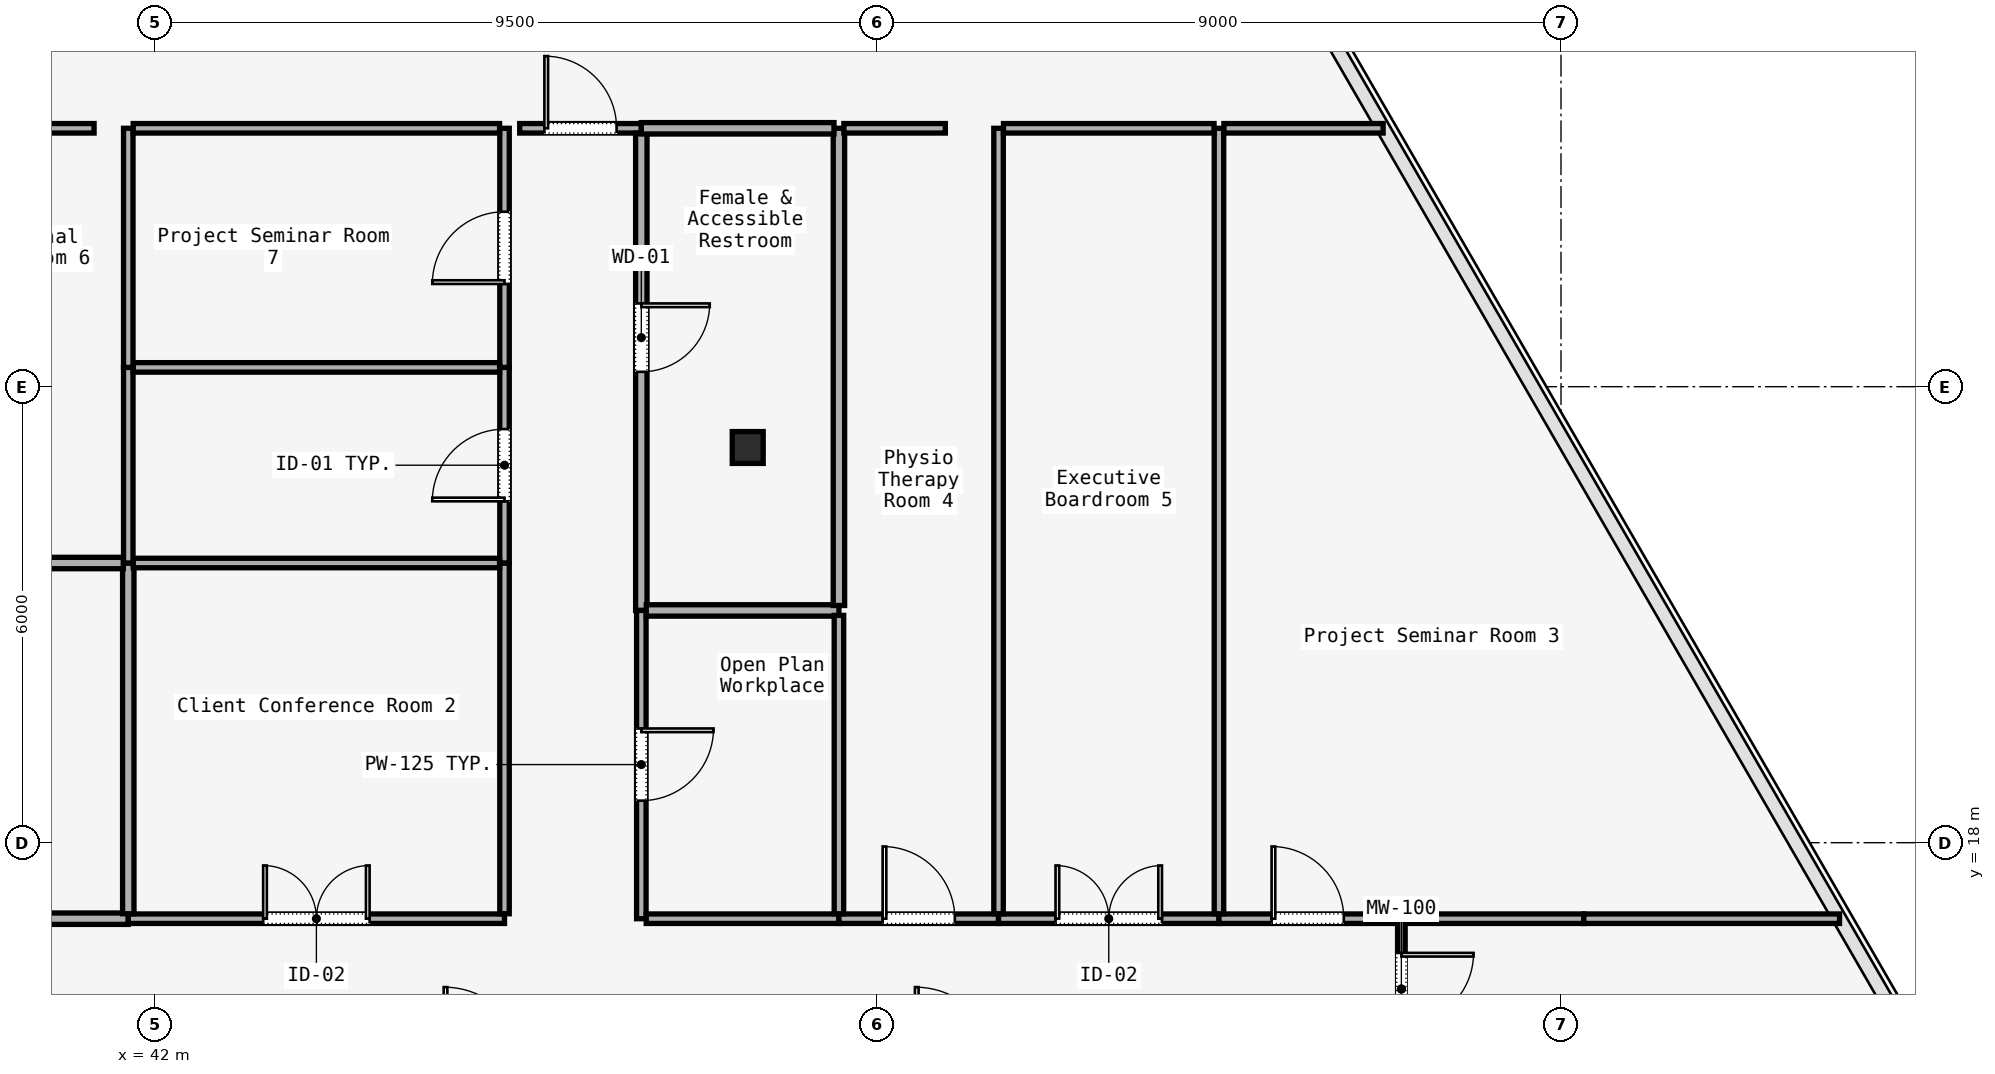
"""IFC4 building model, lengths in metres.
Left out: names, types, materials, properties, quantities, classifications, styles, units other than length and angle.
Written with IfcOpenShell. Run it as: python <this file> out.ifc"""

import sys

from ifc_helpers import new_model, si_unit, direction, frame, frame_2d, origin, origin_2d, place, context, subcontext, project, spatial, rectangle, i_section, extrude, element, fill, save


model = new_model("IFC4")
c1 = context("Model", 3, precision=1e-05, world=origin(), true_north=direction((0.0, 1.0)))
c2 = subcontext(c1, "Body", "Model", "MODEL_VIEW")
j1 = project(units=[si_unit("LENGTHUNIT", "METRE"), si_unit("PLANEANGLEUNIT", "RADIAN")], contexts=[c1])
p1 = place(None, origin())
s1 = spatial("IfcSite", under=j1, at=p1, CompositionType="ELEMENT")
p2 = place(p1, origin())
s2 = spatial("IfcBuilding", under=s1, at=p2, CompositionType="ELEMENT")
p3 = place(p2, frame((0.0, 0.0, 161.2)))
s3 = spatial("IfcBuildingStorey", under=s2, at=p3, CompositionType="ELEMENT", Elevation=161.2)
p4 = place(p3, frame((49.8, 23.2, 0.0), z_axis=(0.0, 0.0, 1.0), x_axis=(1.0, 0.0, 0.0)))
e1 = element("IfcColumn", 1, at=p4, inside=s3, PredefinedType="COLUMN", context=c2, shape_type="SweptSolid", body=[
    extrude(i_section(OverallWidth=0.407, OverallDepth=0.419, WebThickness=0.031, FlangeThickness=0.049, FilletRadius=0.015, at=origin_2d()), origin(), (0.0, 0.0, 1.0), 3.58),
])
p5 = place(p3, frame((58.4, 17.0, 0.0), z_axis=(0.0, 0.0, 1.0), x_axis=(0.0, -1.0, 0.0)))
e2 = element("IfcWall", 2, at=p5, inside=s3, PredefinedType="MOVABLE", context=c2, shape_type="SweptSolid", body=[
    extrude(rectangle(XDim=1.85, YDim=0.1, at=frame_2d((0.925, 0.0))), origin(), (0.0, 0.0, 1.0), 3.01),
])
p6 = place(p5, frame((0.45, 0.0, 0.0)))
e3 = element("IfcOpeningElement", 3, at=p6, cuts=e2, PredefinedType="OPENING", context=c2, shape_type="SweptSolid", body=[
    extrude(rectangle(XDim=0.95, YDim=2.2, at=frame_2d((0.475, 1.1))), frame((0.0, 0.05, 0.0), z_axis=(0.0, -1.0, 0.0), x_axis=(1.0, 0.0, 0.0)), (0.0, 0.0, 1.0), 0.1),
])
p7 = place(p3, frame((37.665, 17.0, 0.0), z_axis=(0.0, 0.0, 1.0), x_axis=(1.0, 0.0, 0.0)))
e4 = element("IfcWall", 4, at=p7, inside=s3, PredefinedType="PARTITIONING", context=c2, shape_type="SweptSolid", body=[
    extrude(rectangle(XDim=3.985, YDim=0.15, at=frame_2d((1.992, 0.0))), origin(), (0.0, 0.0, 1.0), 3.01),
])
p8 = place(p3, frame((41.65, 17.0, 0.0), z_axis=(0.0, 0.0, 1.0), x_axis=(1.0, 0.0, 0.0)))
e5 = element("IfcWall", 5, at=p8, inside=s3, PredefinedType="PARTITIONING", context=c2, shape_type="SweptSolid", body=[
    extrude(rectangle(XDim=4.95, YDim=0.125, at=frame_2d((2.475, 0.0))), origin(), (0.0, 0.0, 1.0), 3.01),
])
p9 = place(p8, frame((1.775, 0.0, 0.0)))
e6 = element("IfcOpeningElement", 6, at=p9, cuts=e5, PredefinedType="OPENING", context=c2, shape_type="SweptSolid", body=[
    extrude(rectangle(XDim=1.4, YDim=2.2, at=frame_2d((0.7, 1.1))), frame((0.0, 0.062, 0.0), z_axis=(0.0, -1.0, 0.0), x_axis=(1.0, 0.0, 0.0)), (0.0, 0.0, 1.0), 0.125),
])
p10 = place(p3, frame((46.6, 17.065, 0.0), z_axis=(0.0, 0.0, 1.0), x_axis=(0.0, 1.0, 0.0)))
e7 = element("IfcWall", 7, at=p10, inside=s3, PredefinedType="PARTITIONING", context=c2, shape_type="SweptSolid", body=[
    extrude(rectangle(XDim=4.615, YDim=0.125, at=frame_2d((2.308, 0.0))), origin(), (0.0, 0.0, 1.0), 3.01),
])
p11 = place(p3, frame((46.6, 21.68, 0.0), z_axis=(0.0, 0.0, 1.0), x_axis=(0.0, 1.0, 0.0)))
e8 = element("IfcWall", 8, at=p11, inside=s3, PredefinedType="PARTITIONING", context=c2, shape_type="SweptSolid", body=[
    extrude(rectangle(XDim=2.574, YDim=0.125, at=frame_2d((1.287, 0.0))), origin(), (0.0, 0.0, 1.0), 3.01),
])
p12 = place(p11, frame((0.812, 0.0, 0.0)))
e9 = element("IfcOpeningElement", 9, at=p12, cuts=e8, PredefinedType="OPENING", context=c2, shape_type="SweptSolid", body=[
    extrude(rectangle(XDim=0.95, YDim=2.2, at=frame_2d((0.475, 1.1))), frame((0.0, 0.062, 0.0), z_axis=(0.0, -1.0, 0.0), x_axis=(1.0, 0.0, 0.0)), (0.0, 0.0, 1.0), 0.125),
])
p13 = place(p3, frame((46.6, 24.254, 0.0), z_axis=(0.0, 0.0, 1.0), x_axis=(0.0, 1.0, 0.0)))
e10 = element("IfcWall", 10, at=p13, inside=s3, PredefinedType="PARTITIONING", context=c2, shape_type="SweptSolid", body=[
    extrude(rectangle(XDim=3.146, YDim=0.125, at=frame_2d((1.573, 0.0))), origin(), (0.0, 0.0, 1.0), 3.01),
])
p14 = place(p13, frame((1.098, 0.0, 0.0)))
e11 = element("IfcOpeningElement", 11, at=p14, cuts=e10, PredefinedType="OPENING", context=c2, shape_type="SweptSolid", body=[
    extrude(rectangle(XDim=0.95, YDim=2.2, at=frame_2d((0.475, 1.1))), frame((0.0, 0.062, 0.0), z_axis=(0.0, -1.0, 0.0), x_axis=(1.0, 0.0, 0.0)), (0.0, 0.0, 1.0), 0.125),
])
p15 = place(p3, frame((46.8, 27.4, 0.0), z_axis=(0.0, 0.0, 1.0), x_axis=(1.0, 0.0, 0.0)))
e12 = element("IfcWall", 12, at=p15, inside=s3, PredefinedType="PARTITIONING", context=c2, shape_type="SweptSolid", body=[
    extrude(rectangle(XDim=1.6, YDim=0.125, at=frame_2d((0.8, 0.0))), origin(), (0.0, 0.0, 1.0), 3.01),
])
p16 = place(p15, frame((0.325, 0.0, 0.0)))
e13 = element("IfcOpeningElement", 13, at=p16, cuts=e12, PredefinedType="OPENING", context=c2, shape_type="SweptSolid", body=[
    extrude(rectangle(XDim=0.95, YDim=2.2, at=frame_2d((0.475, 1.1))), frame((0.0, 0.062, 0.0), z_axis=(0.0, -1.0, 0.0), x_axis=(1.0, 0.0, 0.0)), (0.0, 0.0, 1.0), 0.125),
])
p17 = place(p3, frame((48.4, 27.335, 0.0), z_axis=(0.0, 0.0, 1.0), x_axis=(0.0, -1.0, 0.0)))
e14 = element("IfcWall", 14, at=p17, inside=s3, PredefinedType="PARTITIONING", context=c2, shape_type="SweptSolid", body=[
    extrude(rectangle(XDim=6.279, YDim=0.15, at=frame_2d((3.14, 0.0))), origin(), (0.0, 0.0, 1.0), 3.01),
])
p18 = place(p17, frame((2.24, 0.0, 0.0)))
e15 = element("IfcOpeningElement", 15, at=p18, cuts=e14, PredefinedType="OPENING", context=c2, shape_type="SweptSolid", body=[
    extrude(rectangle(XDim=0.9, YDim=2.15, at=frame_2d((0.45, 1.075))), frame((0.0, 0.075, 0.0), z_axis=(0.0, -1.0, 0.0), x_axis=(1.0, 0.0, 0.0)), (0.0, 0.0, 1.0), 0.15),
])
p19 = place(p3, frame((48.4, 21.056, 0.0), z_axis=(0.0, 0.0, 1.0), x_axis=(0.0, -1.0, 0.0)))
e16 = element("IfcWall", 16, at=p19, inside=s3, PredefinedType="PARTITIONING", context=c2, shape_type="SweptSolid", body=[
    extrude(rectangle(XDim=4.056, YDim=0.125, at=frame_2d((2.028, 0.0))), origin(), (0.0, 0.0, 1.0), 3.01),
])
p20 = place(p19, frame((1.553, 0.0, 0.0)))
e17 = element("IfcOpeningElement", 17, at=p20, cuts=e16, PredefinedType="OPENING", context=c2, shape_type="SweptSolid", body=[
    extrude(rectangle(XDim=0.95, YDim=2.2, at=frame_2d((0.475, 1.1))), frame((0.0, 0.062, 0.0), z_axis=(0.0, -1.0, 0.0), x_axis=(1.0, 0.0, 0.0)), (0.0, 0.0, 1.0), 0.125),
])
p21 = place(p3, frame((48.465, 17.0, 0.0), z_axis=(0.0, 0.0, 1.0), x_axis=(1.0, 0.0, 0.0)))
e18 = element("IfcWall", 18, at=p21, inside=s3, PredefinedType="PARTITIONING", context=c2, shape_type="SweptSolid", body=[
    extrude(rectangle(XDim=2.535, YDim=0.125, at=frame_2d((1.268, 0.0))), origin(), (0.0, 0.0, 1.0), 3.01),
])
p22 = place(p3, frame((51.0, 17.0, 0.0), z_axis=(0.0, 0.0, 1.0), x_axis=(1.0, 0.0, 0.0)))
e19 = element("IfcWall", 19, at=p22, inside=s3, PredefinedType="PARTITIONING", context=c2, shape_type="SweptSolid", body=[
    extrude(rectangle(XDim=2.1, YDim=0.125, at=frame_2d((1.05, 0.0))), origin(), (0.0, 0.0, 1.0), 3.01),
])
p23 = place(p22, frame((0.575, 0.0, 0.0)))
e20 = element("IfcOpeningElement", 20, at=p23, cuts=e19, PredefinedType="OPENING", context=c2, shape_type="SweptSolid", body=[
    extrude(rectangle(XDim=0.95, YDim=2.2, at=frame_2d((0.475, 1.1))), frame((0.0, 0.062, 0.0), z_axis=(0.0, -1.0, 0.0), x_axis=(1.0, 0.0, 0.0)), (0.0, 0.0, 1.0), 0.125),
])
p24 = place(p3, frame((53.1, 17.0, 0.0), z_axis=(0.0, 0.0, 1.0), x_axis=(1.0, 0.0, 0.0)))
e21 = element("IfcWall", 21, at=p24, inside=s3, PredefinedType="PARTITIONING", context=c2, shape_type="SweptSolid", body=[
    extrude(rectangle(XDim=2.9, YDim=0.125, at=frame_2d((1.45, 0.0))), origin(), (0.0, 0.0, 1.0), 3.01),
])
p25 = place(p24, frame((0.75, 0.0, 0.0)))
e22 = element("IfcOpeningElement", 22, at=p25, cuts=e21, PredefinedType="OPENING", context=c2, shape_type="SweptSolid", body=[
    extrude(rectangle(XDim=1.4, YDim=2.2, at=frame_2d((0.7, 1.1))), frame((0.0, 0.062, 0.0), z_axis=(0.0, -1.0, 0.0), x_axis=(1.0, 0.0, 0.0)), (0.0, 0.0, 1.0), 0.125),
])
p26 = place(p3, frame((56.0, 17.0, 0.0), z_axis=(0.0, 0.0, 1.0), x_axis=(1.0, 0.0, 0.0)))
e23 = element("IfcWall", 23, at=p26, inside=s3, PredefinedType="PARTITIONING", context=c2, shape_type="SweptSolid", body=[
    extrude(rectangle(XDim=2.335, YDim=0.125, at=frame_2d((1.167, 0.0))), origin(), (0.0, 0.0, 1.0), 3.01),
])
p27 = place(p26, frame((0.692, 0.0, 0.0)))
e24 = element("IfcOpeningElement", 24, at=p27, cuts=e23, PredefinedType="OPENING", context=c2, shape_type="SweptSolid", body=[
    extrude(rectangle(XDim=0.95, YDim=2.2, at=frame_2d((0.475, 1.1))), frame((0.0, 0.062, 0.0), z_axis=(0.0, -1.0, 0.0), x_axis=(1.0, 0.0, 0.0)), (0.0, 0.0, 1.0), 0.125),
])
p28 = place(p3, frame((58.465, 17.0, 0.0), z_axis=(0.0, 0.0, 1.0), x_axis=(1.0, 0.0, 0.0)))
e25 = element("IfcWall", 25, at=p28, inside=s3, PredefinedType="PARTITIONING", context=c2, shape_type="SweptSolid", body=[
    extrude(rectangle(XDim=2.335, YDim=0.125, at=frame_2d((1.167, 0.0))), origin(), (0.0, 0.0, 1.0), 3.01),
])
p29 = place(p3, frame((60.8, 17.0, 0.0), z_axis=(0.0, 0.0, 1.0), x_axis=(1.0, 0.0, 0.0)))
e26 = element("IfcWall", 26, at=p29, inside=s3, PredefinedType="PARTITIONING", context=c2, shape_type="SweptSolid", body=[
    extrude(rectangle(XDim=3.365, YDim=0.125, at=frame_2d((1.682, 0.0))), origin(), (0.0, 0.0, 1.0), 3.01),
])
p30 = place(p3, frame((48.465, 21.056, 0.0), z_axis=(0.0, 0.0, 1.0), x_axis=(1.0, 0.0, 0.0)))
e27 = element("IfcWall", 27, at=p30, inside=s3, PredefinedType="PARTITIONING", context=c2, shape_type="SweptSolid", body=[
    extrude(rectangle(XDim=2.535, YDim=0.15, at=frame_2d((1.268, 0.0))), origin(), (0.0, 0.0, 1.0), 3.01),
])
p31 = place(p3, frame((51.0, 20.991, 0.0), z_axis=(0.0, 0.0, 1.0), x_axis=(0.0, -1.0, 0.0)))
e28 = element("IfcWall", 28, at=p31, inside=s3, PredefinedType="PARTITIONING", context=c2, shape_type="SweptSolid", body=[
    extrude(rectangle(XDim=3.926, YDim=0.125, at=frame_2d((1.963, 0.0))), origin(), (0.0, 0.0, 1.0), 3.01),
])
p32 = place(p3, frame((41.65, 21.68, 0.0), z_axis=(0.0, 0.0, 1.0), x_axis=(0.0, -1.0, 0.0)))
e29 = element("IfcWall", 29, at=p32, inside=s3, PredefinedType="PARTITIONING", context=c2, shape_type="SweptSolid", body=[
    extrude(rectangle(XDim=4.615, YDim=0.15, at=frame_2d((2.308, 0.0))), origin(), (0.0, 0.0, 1.0), 3.01),
])
p33 = place(p3, frame((37.665, 21.68, 0.0), z_axis=(0.0, 0.0, 1.0), x_axis=(1.0, 0.0, 0.0)))
e30 = element("IfcWall", 30, at=p33, inside=s3, PredefinedType="PARTITIONING", context=c2, shape_type="SweptSolid", body=[
    extrude(rectangle(XDim=3.92, YDim=0.15, at=frame_2d((1.96, 0.0))), origin(), (0.0, 0.0, 1.0), 3.01),
])
p34 = place(p3, frame((41.715, 21.68, 0.0), z_axis=(0.0, 0.0, 1.0), x_axis=(1.0, 0.0, 0.0)))
e31 = element("IfcWall", 31, at=p34, inside=s3, PredefinedType="PARTITIONING", context=c2, shape_type="SweptSolid", body=[
    extrude(rectangle(XDim=4.82, YDim=0.125, at=frame_2d((2.41, 0.0))), origin(), (0.0, 0.0, 1.0), 3.01),
])
p35 = place(p3, frame((56.0, 17.065, 0.0), z_axis=(0.0, 0.0, 1.0), x_axis=(0.0, 1.0, 0.0)))
e32 = element("IfcWall", 32, at=p35, inside=s3, PredefinedType="PARTITIONING", context=c2, shape_type="SweptSolid", body=[
    extrude(rectangle(XDim=10.335, YDim=0.125, at=frame_2d((5.167, 0.0))), origin(), (0.0, 0.0, 1.0), 3.01),
])
p36 = place(p3, frame((56.065, 27.4, 0.0), z_axis=(0.0, 0.0, 1.0), x_axis=(1.0, 0.0, 0.0)))
e33 = element("IfcWall", 33, at=p36, inside=s3, PredefinedType="PARTITIONING", context=c2, shape_type="SweptSolid", body=[
    extrude(rectangle(XDim=2.095, YDim=0.125, at=frame_2d((1.048, 0.0))), origin(), (0.0, 0.0, 1.0), 3.01),
])
p37 = place(p3, frame((51.0, 21.121, 0.0), z_axis=(0.0, 0.0, 1.0), x_axis=(0.0, 1.0, 0.0)))
e34 = element("IfcWall", 34, at=p37, inside=s3, PredefinedType="PARTITIONING", context=c2, shape_type="SweptSolid", body=[
    extrude(rectangle(XDim=6.279, YDim=0.15, at=frame_2d((3.139, 0.0))), origin(), (0.0, 0.0, 1.0), 3.01),
])
p38 = place(p3, frame((51.065, 27.4, 0.0), z_axis=(0.0, 0.0, 1.0), x_axis=(1.0, 0.0, 0.0)))
e35 = element("IfcWall", 35, at=p38, inside=s3, PredefinedType="PARTITIONING", context=c2, shape_type="SweptSolid", body=[
    extrude(rectangle(XDim=1.335, YDim=0.125, at=frame_2d((0.667, 0.0))), origin(), (0.0, 0.0, 1.0), 3.01),
])
p39 = place(p3, frame((53.1, 27.4, 0.0), z_axis=(0.0, 0.0, 1.0), x_axis=(0.0, -1.0, 0.0)))
e36 = element("IfcWall", 36, at=p39, inside=s3, PredefinedType="PARTITIONING", context=c2, shape_type="SweptSolid", body=[
    extrude(rectangle(XDim=10.335, YDim=0.125, at=frame_2d((5.167, 0.0))), origin(), (0.0, 0.0, 1.0), 3.01),
])
p40 = place(p3, frame((53.165, 27.4, 0.0), z_axis=(0.0, 0.0, 1.0), x_axis=(1.0, 0.0, 0.0)))
e37 = element("IfcWall", 37, at=p40, inside=s3, PredefinedType="PARTITIONING", context=c2, shape_type="SweptSolid", body=[
    extrude(rectangle(XDim=2.77, YDim=0.125, at=frame_2d((1.385, 0.0))), origin(), (0.0, 0.0, 1.0), 3.01),
])
p41 = place(p3, frame((41.65, 21.68, 0.0), z_axis=(0.0, 0.0, 1.0), x_axis=(0.0, 1.0, 0.0)))
e38 = element("IfcWall", 38, at=p41, inside=s3, PredefinedType="PARTITIONING", context=c2, shape_type="SweptSolid", body=[
    extrude(rectangle(XDim=2.574, YDim=0.125, at=frame_2d((1.287, 0.0))), origin(), (0.0, 0.0, 1.0), 3.01),
])
p42 = place(p3, frame((41.715, 24.254, 0.0), z_axis=(0.0, 0.0, 1.0), x_axis=(1.0, 0.0, 0.0)))
e39 = element("IfcWall", 39, at=p42, inside=s3, PredefinedType="PARTITIONING", context=c2, shape_type="SweptSolid", body=[
    extrude(rectangle(XDim=4.82, YDim=0.125, at=frame_2d((2.41, 0.0))), origin(), (0.0, 0.0, 1.0), 3.01),
])
p43 = place(p3, frame((48.4, 27.4, 0.0), z_axis=(0.0, 0.0, 1.0), x_axis=(1.0, 0.0, 0.0)))
e40 = element("IfcWall", 40, at=p43, inside=s3, PredefinedType="PARTITIONING", context=c2, shape_type="SweptSolid", body=[
    extrude(rectangle(XDim=2.535, YDim=0.15, at=frame_2d((1.268, 0.0))), origin(), (0.0, 0.0, 1.0), 3.01),
])
p44 = place(p3, frame((41.65, 27.4, 0.0), z_axis=(0.0, 0.0, 1.0), x_axis=(0.0, -1.0, 0.0)))
e41 = element("IfcWall", 41, at=p44, inside=s3, PredefinedType="PARTITIONING", context=c2, shape_type="SweptSolid", body=[
    extrude(rectangle(XDim=3.146, YDim=0.125, at=frame_2d((1.573, 0.0))), origin(), (0.0, 0.0, 1.0), 3.01),
])
p45 = place(p3, frame((38.445, 27.4, 0.0), z_axis=(0.0, 0.0, 1.0), x_axis=(1.0, 0.0, 0.0)))
e42 = element("IfcWall", 42, at=p45, inside=s3, PredefinedType="PARTITIONING", context=c2, shape_type="SweptSolid", body=[
    extrude(rectangle(XDim=2.755, YDim=0.125, at=frame_2d((1.377, 0.0))), origin(), (0.0, 0.0, 1.0), 3.01),
])
p46 = place(p3, frame((41.715, 27.4, 0.0), z_axis=(0.0, 0.0, 1.0), x_axis=(1.0, 0.0, 0.0)))
e43 = element("IfcWall", 43, at=p46, inside=s3, PredefinedType="PARTITIONING", context=c2, shape_type="SweptSolid", body=[
    extrude(rectangle(XDim=4.82, YDim=0.125, at=frame_2d((2.41, 0.0))), origin(), (0.0, 0.0, 1.0), 3.01),
])
p47 = place(p6, origin())
e44 = element("IfcDoor", 44, at=p47, inside=s3, OperationType="SINGLE_SWING_RIGHT", PredefinedType="DOOR", context=c2, shape_type="SweptSolid", body=[
    extrude(rectangle(XDim=0.95, YDim=2.2, at=frame_2d((0.475, 1.1))), frame((0.0, 0.025, 0.0), z_axis=(0.0, -1.0, 0.0), x_axis=(1.0, 0.0, 0.0)), (0.0, 0.0, 1.0), 0.05),
])
fill(e3, e44)
p48 = place(p20, origin())
e45 = element("IfcDoor", 45, at=p48, inside=s3, OperationType="SINGLE_SWING_LEFT", PredefinedType="DOOR", context=c2, shape_type="SweptSolid", body=[
    extrude(rectangle(XDim=0.95, YDim=2.2, at=frame_2d((0.475, 1.1))), frame((0.0, 0.025, 0.0), z_axis=(0.0, -1.0, 0.0), x_axis=(1.0, 0.0, 0.0)), (0.0, 0.0, 1.0), 0.05),
])
fill(e17, e45)
p49 = place(p9, origin())
e46 = element("IfcDoor", 46, at=p49, inside=s3, OperationType="SINGLE_SWING_RIGHT", PredefinedType="DOOR", context=c2, shape_type="SweptSolid", body=[
    extrude(rectangle(XDim=1.4, YDim=2.2, at=frame_2d((0.7, 1.1))), frame((0.0, 0.025, 0.0), z_axis=(0.0, -1.0, 0.0), x_axis=(1.0, 0.0, 0.0)), (0.0, 0.0, 1.0), 0.05),
])
fill(e6, e46)
p50 = place(p27, origin())
e47 = element("IfcDoor", 47, at=p50, inside=s3, OperationType="SINGLE_SWING_LEFT", PredefinedType="DOOR", context=c2, shape_type="SweptSolid", body=[
    extrude(rectangle(XDim=0.95, YDim=2.2, at=frame_2d((0.475, 1.1))), frame((0.0, 0.025, 0.0), z_axis=(0.0, -1.0, 0.0), x_axis=(1.0, 0.0, 0.0)), (0.0, 0.0, 1.0), 0.05),
])
fill(e24, e47)
p51 = place(p23, origin())
e48 = element("IfcDoor", 48, at=p51, inside=s3, OperationType="SINGLE_SWING_LEFT", PredefinedType="DOOR", context=c2, shape_type="SweptSolid", body=[
    extrude(rectangle(XDim=0.95, YDim=2.2, at=frame_2d((0.475, 1.1))), frame((0.0, 0.025, 0.0), z_axis=(0.0, -1.0, 0.0), x_axis=(1.0, 0.0, 0.0)), (0.0, 0.0, 1.0), 0.05),
])
fill(e20, e48)
p52 = place(p25, origin())
e49 = element("IfcDoor", 49, at=p52, inside=s3, OperationType="SINGLE_SWING_RIGHT", PredefinedType="DOOR", context=c2, shape_type="SweptSolid", body=[
    extrude(rectangle(XDim=1.4, YDim=2.2, at=frame_2d((0.7, 1.1))), frame((0.0, 0.025, 0.0), z_axis=(0.0, -1.0, 0.0), x_axis=(1.0, 0.0, 0.0)), (0.0, 0.0, 1.0), 0.05),
])
fill(e22, e49)
p53 = place(p12, origin())
e50 = element("IfcDoor", 50, at=p53, inside=s3, OperationType="SINGLE_SWING_LEFT", PredefinedType="DOOR", context=c2, shape_type="SweptSolid", body=[
    extrude(rectangle(XDim=0.95, YDim=2.2, at=frame_2d((0.475, 1.1))), frame((0.0, 0.025, 0.0), z_axis=(0.0, -1.0, 0.0), x_axis=(1.0, 0.0, 0.0)), (0.0, 0.0, 1.0), 0.05),
])
fill(e9, e50)
p54 = place(p18, origin())
e51 = element("IfcDoor", 51, at=p54, inside=s3, OperationType="SINGLE_SWING_RIGHT", PredefinedType="DOOR", context=c2, shape_type="SweptSolid", body=[
    extrude(rectangle(XDim=0.9, YDim=2.15, at=frame_2d((0.45, 1.075))), frame((0.0, 0.025, 0.0), z_axis=(0.0, -1.0, 0.0), x_axis=(1.0, 0.0, 0.0)), (0.0, 0.0, 1.0), 0.05),
])
fill(e15, e51)
p55 = place(p14, origin())
e52 = element("IfcDoor", 52, at=p55, inside=s3, OperationType="SINGLE_SWING_LEFT", PredefinedType="DOOR", context=c2, shape_type="SweptSolid", body=[
    extrude(rectangle(XDim=0.95, YDim=2.2, at=frame_2d((0.475, 1.1))), frame((0.0, 0.025, 0.0), z_axis=(0.0, -1.0, 0.0), x_axis=(1.0, 0.0, 0.0)), (0.0, 0.0, 1.0), 0.05),
])
fill(e11, e52)
p56 = place(p16, origin())
e53 = element("IfcDoor", 53, at=p56, inside=s3, OperationType="SINGLE_SWING_LEFT", PredefinedType="DOOR", context=c2, shape_type="SweptSolid", body=[
    extrude(rectangle(XDim=0.95, YDim=2.2, at=frame_2d((0.475, 1.1))), frame((0.0, 0.025, 0.0), z_axis=(0.0, -1.0, 0.0), x_axis=(1.0, 0.0, 0.0)), (0.0, 0.0, 1.0), 0.05),
])
fill(e13, e53)
save(model, sys.argv[1])
